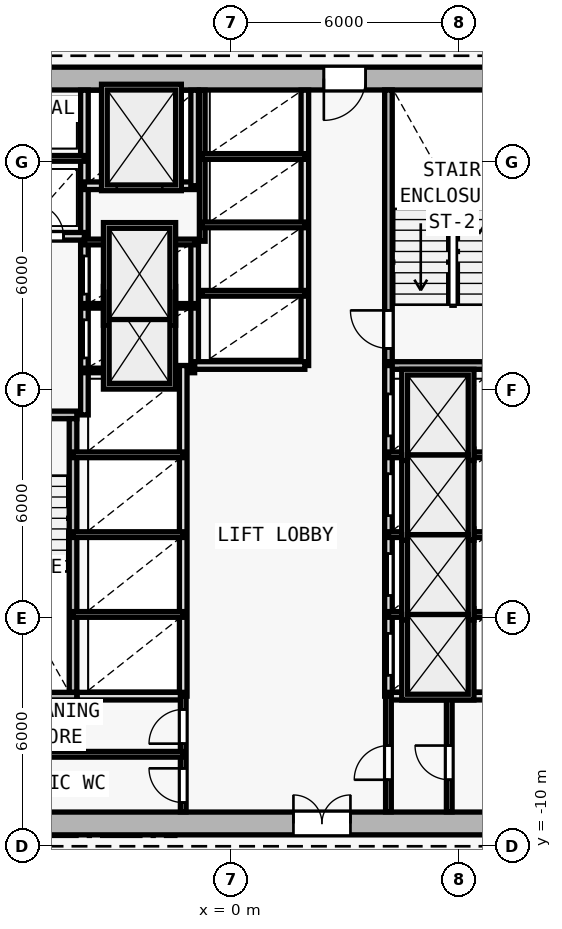
"""IFC4 building model, lengths in metres.
Left out: names, types, materials, properties, quantities, classifications, styles, units other than length and angle.
Written with IfcOpenShell. Run it as: python <this file> out.ifc"""

import sys

from ifc_helpers import new_model, si_unit, direction, frame, frame_2d, origin, origin_2d, place, context, subcontext, project, spatial, rectangle, i_section, extrude, element, fill, save


model = new_model("IFC4")
c1 = context("Model", 3, precision=1e-05, world=origin(), true_north=direction((0.0, 1.0)))
c2 = subcontext(c1, "Body", "Model", "MODEL_VIEW")
j1 = project(units=[si_unit("LENGTHUNIT", "METRE"), si_unit("PLANEANGLEUNIT", "RADIAN")], contexts=[c1])
p1 = place(None, origin())
s1 = spatial("IfcSite", under=j1, at=p1, CompositionType="ELEMENT")
p2 = place(p1, origin())
s2 = spatial("IfcBuilding", under=s1, at=p2, CompositionType="ELEMENT")
p3 = place(p2, frame((0.0, 0.0, 37.2)))
s3 = spatial("IfcBuildingStorey", under=s2, at=p3, CompositionType="ELEMENT", Elevation=37.2)
p4 = place(p3, frame((0.0, -9.4, 0.0), z_axis=(0.0, 0.0, 1.0), x_axis=(1.0, 0.0, 0.0)))
e1 = element("IfcColumn", 1, at=p4, inside=s3, PredefinedType="COLUMN", context=c2, shape_type="SweptSolid", body=[
    extrude(i_section(OverallWidth=0.416, OverallDepth=0.446, WebThickness=0.025, FlangeThickness=0.04, FilletRadius=0.015, at=origin_2d()), origin(), (0.0, 0.0, 1.0), 3.6),
])
p5 = place(p3, frame((-8.0, -9.4, 0.0), z_axis=(0.0, 0.0, 1.0), x_axis=(1.0, 0.0, 0.0)))
e2 = element("IfcWall", 2, at=p5, inside=s3, PredefinedType="SHEAR", context=c2, shape_type="SweptSolid", body=[
    extrude(rectangle(XDim=16.0, YDim=0.6, at=frame_2d((8.0, 0.0))), origin(), (0.0, 0.0, 1.0), 3.35),
])
p6 = place(p5, frame((9.65, 0.0, 0.0)))
e3 = element("IfcOpeningElement", 3, at=p6, cuts=e2, PredefinedType="OPENING", context=c2, shape_type="SweptSolid", body=[
    extrude(rectangle(XDim=1.5, YDim=2.2, at=frame_2d((0.75, 1.1))), frame((0.0, 0.31, 0.0), z_axis=(0.0, -1.0, 0.0), x_axis=(1.0, 0.0, 0.0)), (0.0, 0.0, 1.0), 0.62),
])
p7 = place(p3, frame((8.0, 10.2, 0.0), z_axis=(0.0, 0.0, 1.0), x_axis=(-1.0, 0.0, 0.0)))
e4 = element("IfcWall", 4, at=p7, inside=s3, PredefinedType="SHEAR", context=c2, shape_type="SweptSolid", body=[
    extrude(rectangle(XDim=16.0, YDim=0.6, at=frame_2d((8.0, 0.0))), origin(), (0.0, 0.0, 1.0), 3.35),
])
p8 = place(p7, frame((4.45, 0.0, 0.0)))
e5 = element("IfcOpeningElement", 5, at=p8, cuts=e4, PredefinedType="OPENING", context=c2, shape_type="SweptSolid", body=[
    extrude(rectangle(XDim=1.1, YDim=2.15, at=frame_2d((0.55, 1.075))), frame((0.0, 0.31, 0.0), z_axis=(0.0, -1.0, 0.0), x_axis=(1.0, 0.0, 0.0)), (0.0, 0.0, 1.0), 0.62),
])
p9 = place(p3, frame((-7.4, 1.35, 0.0), z_axis=(0.0, 0.0, 1.0), x_axis=(1.0, 0.0, 0.0)))
e6 = element("IfcWall", 6, at=p9, inside=s3, PredefinedType="SOLIDWALL", context=c2, shape_type="SweptSolid", body=[
    extrude(rectangle(XDim=3.35, YDim=0.2, at=frame_2d((1.675, 0.0))), origin(), (0.0, 0.0, 1.0), 3.35),
])
p10 = place(p9, frame((0.65, 0.0, 0.0)))
e7 = element("IfcOpeningElement", 7, at=p10, cuts=e6, PredefinedType="OPENING", context=c2, shape_type="SweptSolid", body=[
    extrude(rectangle(XDim=1.0, YDim=2.15, at=frame_2d((0.5, 1.075))), frame((0.0, 0.11, 0.0), z_axis=(0.0, -1.0, 0.0), x_axis=(1.0, 0.0, 0.0)), (0.0, 0.0, 1.0), 0.22),
])
p11 = place(p3, frame((-4.15, -5.95, 0.0), z_axis=(0.0, 0.0, 1.0), x_axis=(0.0, 1.0, 0.0)))
e8 = element("IfcWall", 8, at=p11, inside=s3, PredefinedType="SOLIDWALL", context=c2, shape_type="SweptSolid", body=[
    extrude(rectangle(XDim=7.2, YDim=0.2, at=frame_2d((3.6, 0.0))), origin(), (0.0, 0.0, 1.0), 3.35),
])
p12 = place(p3, frame((-3.85, 1.35, 0.0), z_axis=(0.0, 0.0, 1.0), x_axis=(0.0, 1.0, 0.0)))
e9 = element("IfcWall", 9, at=p12, inside=s3, PredefinedType="SOLIDWALL", context=c2, shape_type="SweptSolid", body=[
    extrude(rectangle(XDim=8.545, YDim=0.2, at=frame_2d((4.272, 0.0))), origin(), (0.0, 0.0, 1.0), 3.35),
])
p13 = place(p12, frame((1.5, 0.0, 0.0)))
e10 = element("IfcOpeningElement", 10, at=p13, cuts=e9, PredefinedType="OPENING", context=c2, shape_type="SweptSolid", body=[
    extrude(rectangle(XDim=1.0, YDim=2.15, at=frame_2d((0.5, 1.075))), frame((0.0, 0.11, 0.0), z_axis=(0.0, -1.0, 0.0), x_axis=(1.0, 0.0, 0.0)), (0.0, 0.0, 1.0), 0.22),
])
p14 = place(p12, frame((3.18, 0.0, 0.0)))
e11 = element("IfcOpeningElement", 11, at=p14, cuts=e9, PredefinedType="OPENING", context=c2, shape_type="SweptSolid", body=[
    extrude(rectangle(XDim=1.0, YDim=2.15, at=frame_2d((0.5, 1.075))), frame((0.0, 0.11, 0.0), z_axis=(0.0, -1.0, 0.0), x_axis=(1.0, 0.0, 0.0)), (0.0, 0.0, 1.0), 0.22),
])
p15 = place(p3, frame((-7.395, 6.05, 0.0), z_axis=(0.0, 0.0, 1.0), x_axis=(1.0, 0.0, 0.0)))
e12 = element("IfcWall", 12, at=p15, inside=s3, PredefinedType="SOLIDWALL", context=c2, shape_type="SweptSolid", body=[
    extrude(rectangle(XDim=3.545, YDim=0.2, at=frame_2d((1.772, 0.0))), origin(), (0.0, 0.0, 1.0), 3.35),
])
p16 = place(p15, frame((0.345, 0.0, 0.0)))
e13 = element("IfcOpeningElement", 13, at=p16, cuts=e12, PredefinedType="OPENING", context=c2, shape_type="SweptSolid", body=[
    extrude(rectangle(XDim=0.85, YDim=2.1, at=frame_2d((0.425, 1.05))), frame((0.0, 0.11, 0.0), z_axis=(0.0, -1.0, 0.0), x_axis=(1.0, 0.0, 0.0)), (0.0, 0.0, 1.0), 0.22),
])
p17 = place(p15, frame((2.145, 0.0, 0.0)))
e14 = element("IfcOpeningElement", 14, at=p17, cuts=e12, PredefinedType="OPENING", context=c2, shape_type="SweptSolid", body=[
    extrude(rectangle(XDim=0.85, YDim=2.1, at=frame_2d((0.425, 1.05))), frame((0.0, 0.11, 0.0), z_axis=(0.0, -1.0, 0.0), x_axis=(1.0, 0.0, 0.0)), (0.0, 0.0, 1.0), 0.22),
])
p18 = place(p3, frame((-7.395, 8.1, 0.0), z_axis=(0.0, 0.0, 1.0), x_axis=(1.0, 0.0, 0.0)))
e15 = element("IfcWall", 15, at=p18, inside=s3, PredefinedType="PARTITIONING", context=c2, shape_type="SweptSolid", body=[
    extrude(rectangle(XDim=3.545, YDim=0.15, at=frame_2d((1.772, 0.0))), origin(), (0.0, 0.0, 1.0), 3.35),
])
p19 = place(p3, frame((4.15, 2.75, 0.0), z_axis=(0.0, 0.0, 1.0), x_axis=(0.0, 1.0, 0.0)))
e16 = element("IfcWall", 16, at=p19, inside=s3, PredefinedType="SOLIDWALL", context=c2, shape_type="SweptSolid", body=[
    extrude(rectangle(XDim=7.15, YDim=0.2, at=frame_2d((3.575, 0.0))), origin(), (0.0, 0.0, 1.0), 3.35),
])
p20 = place(p19, frame((0.35, 0.0, 0.0)))
e17 = element("IfcOpeningElement", 17, at=p20, cuts=e16, PredefinedType="OPENING", context=c2, shape_type="SweptSolid", body=[
    extrude(rectangle(XDim=1.0, YDim=2.15, at=frame_2d((0.5, 1.075))), frame((0.0, 0.11, 0.0), z_axis=(0.0, -1.0, 0.0), x_axis=(1.0, 0.0, 0.0)), (0.0, 0.0, 1.0), 0.22),
])
p21 = place(p3, frame((4.05, 2.65, 0.0), z_axis=(0.0, 0.0, 1.0), x_axis=(1.0, 0.0, 0.0)))
e18 = element("IfcWall", 18, at=p21, inside=s3, PredefinedType="SOLIDWALL", context=c2, shape_type="SweptSolid", body=[
    extrude(rectangle(XDim=3.35, YDim=0.2, at=frame_2d((1.675, 0.0))), origin(), (0.0, 0.0, 1.0), 3.35),
])
p22 = place(p3, frame((-0.95, 2.65, 0.0), z_axis=(0.0, 0.0, 1.0), x_axis=(0.0, 1.0, 0.0)))
e19 = element("IfcWall", 19, at=p22, inside=s3, PredefinedType="SOLIDWALL", context=c2, shape_type="SweptSolid", body=[
    extrude(rectangle(XDim=3.27, YDim=0.2, at=frame_2d((1.635, 0.0))), origin(), (0.0, 0.0, 1.0), 3.35),
])
for number, where, z_axis, x_axis in (
    (20, (-3.85, 2.52, 0.0), (0.0, 0.0, 1.0), (1.0, 0.0, 0.0)),
    (21, (-3.85, 4.22, 0.0), (0.0, 0.0, 1.0), (1.0, 0.0, 0.0)),
):
    element("IfcWall", number, at=place(p3, frame(where, z_axis=z_axis, x_axis=x_axis)), inside=s3, PredefinedType="PARTITIONING", context=c2, shape_type="SweptSolid", body=[
        extrude(rectangle(XDim=2.9, YDim=0.12, at=frame_2d((1.45, 0.0))), origin(), (0.0, 0.0, 1.0), 3.35),
    ])
p23 = place(p3, frame((-3.85, 5.9, 0.0), z_axis=(0.0, 0.0, 1.0), x_axis=(1.0, 0.0, 0.0)))
e22 = element("IfcWall", 22, at=p23, inside=s3, PredefinedType="PARTITIONING", context=c2, shape_type="SweptSolid", body=[
    extrude(rectangle(XDim=2.9, YDim=0.15, at=frame_2d((1.45, 0.0))), origin(), (0.0, 0.0, 1.0), 3.35),
])
p24 = place(p3, frame((-3.85, 7.38, 0.0), z_axis=(0.0, 0.0, 1.0), x_axis=(1.0, 0.0, 0.0)))
e23 = element("IfcWall", 23, at=p24, inside=s3, PredefinedType="SOLIDWALL", context=c2, shape_type="SweptSolid", body=[
    extrude(rectangle(XDim=2.9, YDim=0.2, at=frame_2d((1.45, 0.0))), origin(), (0.0, 0.0, 1.0), 3.35),
])
p25 = place(p24, frame((0.85, 0.0, 0.0)))
e24 = element("IfcOpeningElement", 24, at=p25, cuts=e23, PredefinedType="OPENING", context=c2, shape_type="SweptSolid", body=[
    extrude(rectangle(XDim=1.2, YDim=2.2, at=frame_2d((0.6, 1.1))), frame((0.0, 0.11, 0.0), z_axis=(0.0, -1.0, 0.0), x_axis=(1.0, 0.0, 0.0)), (0.0, 0.0, 1.0), 0.22),
])
p26 = place(p3, frame((-0.95, 7.38, 0.0), z_axis=(0.0, 0.0, 1.0), x_axis=(0.0, 1.0, 0.0)))
e25 = element("IfcWall", 25, at=p26, inside=s3, PredefinedType="SOLIDWALL", context=c2, shape_type="SweptSolid", body=[
    extrude(rectangle(XDim=2.515, YDim=0.2, at=frame_2d((1.258, 0.0))), origin(), (0.0, 0.0, 1.0), 3.35),
])
p27 = place(p3, frame((4.15, -6.05, 0.0), z_axis=(0.0, 0.0, 1.0), x_axis=(0.0, 1.0, 0.0)))
e26 = element("IfcWall", 26, at=p27, inside=s3, PredefinedType="SOLIDWALL", context=c2, shape_type="SweptSolid", body=[
    extrude(rectangle(XDim=8.7, YDim=0.2, at=frame_2d((4.35, 0.0))), origin(), (0.0, 0.0, 1.0), 3.35),
])
p28 = place(p27, frame((0.55, 0.0, 0.0)))
e27 = element("IfcOpeningElement", 27, at=p28, cuts=e26, PredefinedType="OPENING", context=c2, shape_type="SweptSolid", body=[
    extrude(rectangle(XDim=1.1, YDim=2.15, at=frame_2d((0.55, 1.075))), frame((0.0, 0.11, 0.0), z_axis=(0.0, -1.0, 0.0), x_axis=(1.0, 0.0, 0.0)), (0.0, 0.0, 1.0), 0.22),
])
p29 = place(p27, frame((2.65, 0.0, 0.0)))
e28 = element("IfcOpeningElement", 28, at=p29, cuts=e26, PredefinedType="OPENING", context=c2, shape_type="SweptSolid", body=[
    extrude(rectangle(XDim=1.1, YDim=2.15, at=frame_2d((0.55, 1.075))), frame((0.0, 0.11, 0.0), z_axis=(0.0, -1.0, 0.0), x_axis=(1.0, 0.0, 0.0)), (0.0, 0.0, 1.0), 0.22),
])
p30 = place(p27, frame((4.75, 0.0, 0.0)))
e29 = element("IfcOpeningElement", 29, at=p30, cuts=e26, PredefinedType="OPENING", context=c2, shape_type="SweptSolid", body=[
    extrude(rectangle(XDim=1.1, YDim=2.15, at=frame_2d((0.55, 1.075))), frame((0.0, 0.11, 0.0), z_axis=(0.0, -1.0, 0.0), x_axis=(1.0, 0.0, 0.0)), (0.0, 0.0, 1.0), 0.22),
])
p31 = place(p27, frame((6.85, 0.0, 0.0)))
e30 = element("IfcOpeningElement", 30, at=p31, cuts=e26, PredefinedType="OPENING", context=c2, shape_type="SweptSolid", body=[
    extrude(rectangle(XDim=1.1, YDim=2.15, at=frame_2d((0.55, 1.075))), frame((0.0, 0.11, 0.0), z_axis=(0.0, -1.0, 0.0), x_axis=(1.0, 0.0, 0.0)), (0.0, 0.0, 1.0), 0.22),
])
for number, where, z_axis, x_axis in (
    (31, (4.15, -3.9, 0.0), (0.0, 0.0, 1.0), (1.0, 0.0, 0.0)),
    (32, (4.15, -1.8, 0.0), (0.0, 0.0, 1.0), (1.0, 0.0, 0.0)),
    (33, (4.15, 0.3, 0.0), (0.0, 0.0, 1.0), (1.0, 0.0, 0.0)),
):
    element("IfcWall", number, at=place(p3, frame(where, z_axis=z_axis, x_axis=x_axis)), inside=s3, PredefinedType="PARTITIONING", context=c2, shape_type="SweptSolid", body=[
        extrude(rectangle(XDim=2.6, YDim=0.15, at=frame_2d((1.3, 0.0))), origin(), (0.0, 0.0, 1.0), 3.35),
    ])
p32 = place(p3, frame((-1.25, -6.05, 0.0), z_axis=(0.0, 0.0, 1.0), x_axis=(0.0, 1.0, 0.0)))
e34 = element("IfcWall", 34, at=p32, inside=s3, PredefinedType="SOLIDWALL", context=c2, shape_type="SweptSolid", body=[
    extrude(rectangle(XDim=8.7, YDim=0.2, at=frame_2d((4.35, 0.0))), origin(), (0.0, 0.0, 1.0), 3.35),
])
for number, where, z_axis, x_axis in (
    (35, (-4.15, -3.9, 0.0), (0.0, 0.0, 1.0), (1.0, 0.0, 0.0)),
    (36, (-4.15, -1.8, 0.0), (0.0, 0.0, 1.0), (1.0, 0.0, 0.0)),
    (37, (-4.15, 0.3, 0.0), (0.0, 0.0, 1.0), (1.0, 0.0, 0.0)),
):
    element("IfcWall", number, at=place(p3, frame(where, z_axis=z_axis, x_axis=x_axis)), inside=s3, PredefinedType="PARTITIONING", context=c2, shape_type="SweptSolid", body=[
        extrude(rectangle(XDim=2.9, YDim=0.15, at=frame_2d((1.45, 0.0))), origin(), (0.0, 0.0, 1.0), 3.35),
    ])
p33 = place(p3, frame((1.95, 2.65, 0.0), z_axis=(0.0, 0.0, 1.0), x_axis=(0.0, 1.0, 0.0)))
e38 = element("IfcWall", 38, at=p33, inside=s3, PredefinedType="SOLIDWALL", context=c2, shape_type="SweptSolid", body=[
    extrude(rectangle(XDim=7.245, YDim=0.2, at=frame_2d((3.623, 0.0))), origin(), (0.0, 0.0, 1.0), 3.35),
])
p34 = place(p3, frame((-0.95, 2.65, 0.0), z_axis=(0.0, 0.0, 1.0), x_axis=(1.0, 0.0, 0.0)))
e39 = element("IfcWall", 39, at=p34, inside=s3, PredefinedType="SOLIDWALL", context=c2, shape_type="SweptSolid", body=[
    extrude(rectangle(XDim=2.9, YDim=0.2, at=frame_2d((1.45, 0.0))), origin(), (0.0, 0.0, 1.0), 3.35),
])
p35 = place(p3, frame((-0.75, 5.92, 0.0), z_axis=(0.0, 0.0, 1.0), x_axis=(0.0, 1.0, 0.0)))
e40 = element("IfcWall", 40, at=p35, inside=s3, PredefinedType="PARTITIONING", context=c2, shape_type="SweptSolid", body=[
    extrude(rectangle(XDim=3.975, YDim=0.15, at=frame_2d((1.988, 0.0))), origin(), (0.0, 0.0, 1.0), 3.35),
])
for number, where, z_axis, x_axis in (
    (41, (-0.75, 4.55, 0.0), (0.0, 0.0, 1.0), (1.0, 0.0, 0.0)),
    (42, (-0.75, 6.35, 0.0), (0.0, 0.0, 1.0), (1.0, 0.0, 0.0)),
    (43, (-0.75, 8.15, 0.0), (0.0, 0.0, 1.0), (1.0, 0.0, 0.0)),
):
    element("IfcWall", number, at=place(p3, frame(where, z_axis=z_axis, x_axis=x_axis)), inside=s3, PredefinedType="PARTITIONING", context=c2, shape_type="SweptSolid", body=[
        extrude(rectangle(XDim=2.7, YDim=0.15, at=frame_2d((1.35, 0.0))), origin(), (0.0, 0.0, 1.0), 3.35),
    ])
p36 = place(p3, frame((-7.4, -6.05, 0.0), z_axis=(0.0, 0.0, 1.0), x_axis=(1.0, 0.0, 0.0)))
e44 = element("IfcWall", 44, at=p36, inside=s3, PredefinedType="SOLIDWALL", context=c2, shape_type="SweptSolid", body=[
    extrude(rectangle(XDim=3.35, YDim=0.2, at=frame_2d((1.675, 0.0))), origin(), (0.0, 0.0, 1.0), 3.35),
])
p37 = place(p3, frame((-4.04, -6.05, 0.0), z_axis=(0.0, 0.0, 1.0), x_axis=(1.0, 0.0, 0.0)))
e45 = element("IfcWall", 45, at=p37, inside=s3, PredefinedType="SOLIDWALL", context=c2, shape_type="SweptSolid", body=[
    extrude(rectangle(XDim=2.79, YDim=0.2, at=frame_2d((1.395, 0.0))), origin(), (0.0, 0.0, 1.0), 3.35),
])
p38 = place(p3, frame((4.15, -6.05, 0.0), z_axis=(0.0, 0.0, 1.0), x_axis=(1.0, 0.0, 0.0)))
e46 = element("IfcWall", 46, at=p38, inside=s3, PredefinedType="SOLIDWALL", context=c2, shape_type="SweptSolid", body=[
    extrude(rectangle(XDim=3.245, YDim=0.2, at=frame_2d((1.623, 0.0))), origin(), (0.0, 0.0, 1.0), 3.35),
])
p39 = place(p3, frame((-1.25, -9.095, 0.0), z_axis=(0.0, 0.0, 1.0), x_axis=(0.0, 1.0, 0.0)))
e47 = element("IfcWall", 47, at=p39, inside=s3, PredefinedType="PARTITIONING", context=c2, shape_type="SweptSolid", body=[
    extrude(rectangle(XDim=3.045, YDim=0.15, at=frame_2d((1.522, 0.0))), origin(), (0.0, 0.0, 1.0), 3.35),
])
p40 = place(p39, frame((1.795, 0.0, 0.0)))
e48 = element("IfcOpeningElement", 48, at=p40, cuts=e47, PredefinedType="OPENING", context=c2, shape_type="SweptSolid", body=[
    extrude(rectangle(XDim=0.9, YDim=2.1, at=frame_2d((0.45, 1.05))), frame((0.0, 0.085, 0.0), z_axis=(0.0, -1.0, 0.0), x_axis=(1.0, 0.0, 0.0)), (0.0, 0.0, 1.0), 0.17),
])
p41 = place(p39, frame((0.245, 0.0, 0.0)))
e49 = element("IfcOpeningElement", 49, at=p41, cuts=e47, PredefinedType="OPENING", context=c2, shape_type="SweptSolid", body=[
    extrude(rectangle(XDim=0.9, YDim=2.1, at=frame_2d((0.45, 1.05))), frame((0.0, 0.085, 0.0), z_axis=(0.0, -1.0, 0.0), x_axis=(1.0, 0.0, 0.0)), (0.0, 0.0, 1.0), 0.17),
])
p42 = place(p3, frame((4.15, -9.095, 0.0), z_axis=(0.0, 0.0, 1.0), x_axis=(0.0, 1.0, 0.0)))
e50 = element("IfcWall", 50, at=p42, inside=s3, PredefinedType="PARTITIONING", context=c2, shape_type="SweptSolid", body=[
    extrude(rectangle(XDim=3.045, YDim=0.15, at=frame_2d((1.522, 0.0))), origin(), (0.0, 0.0, 1.0), 3.35),
])
p43 = place(p42, frame((0.845, 0.0, 0.0)))
e51 = element("IfcOpeningElement", 51, at=p43, cuts=e50, PredefinedType="OPENING", context=c2, shape_type="SweptSolid", body=[
    extrude(rectangle(XDim=0.9, YDim=2.1, at=frame_2d((0.45, 1.05))), frame((0.0, 0.085, 0.0), z_axis=(0.0, -1.0, 0.0), x_axis=(1.0, 0.0, 0.0)), (0.0, 0.0, 1.0), 0.17),
])
p44 = place(p3, frame((-7.395, -7.58, 0.0), z_axis=(0.0, 0.0, 1.0), x_axis=(1.0, 0.0, 0.0)))
e52 = element("IfcWall", 52, at=p44, inside=s3, PredefinedType="PARTITIONING", context=c2, shape_type="SweptSolid", body=[
    extrude(rectangle(XDim=6.145, YDim=0.15, at=frame_2d((3.073, 0.0))), origin(), (0.0, 0.0, 1.0), 3.35),
])
p45 = place(p3, frame((5.75, -9.095, 0.0), z_axis=(0.0, 0.0, 1.0), x_axis=(0.0, 1.0, 0.0)))
e53 = element("IfcWall", 53, at=p45, inside=s3, PredefinedType="PARTITIONING", context=c2, shape_type="SweptSolid", body=[
    extrude(rectangle(XDim=3.045, YDim=0.15, at=frame_2d((1.522, 0.0))), origin(), (0.0, 0.0, 1.0), 3.35),
])
p46 = place(p45, frame((0.845, 0.0, 0.0)))
e54 = element("IfcOpeningElement", 54, at=p46, cuts=e53, PredefinedType="OPENING", context=c2, shape_type="SweptSolid", body=[
    extrude(rectangle(XDim=0.9, YDim=2.1, at=frame_2d((0.45, 1.05))), frame((0.0, 0.085, 0.0), z_axis=(0.0, -1.0, 0.0), x_axis=(1.0, 0.0, 0.0)), (0.0, 0.0, 1.0), 0.17),
])
p47 = place(p6, origin())
e55 = element("IfcDoor", 55, at=p47, inside=s3, OperationType="DOUBLE_DOOR_SINGLE_SWING", PredefinedType="DOOR", context=c2, shape_type="SweptSolid", body=[
    extrude(rectangle(XDim=1.5, YDim=2.2, at=frame_2d((0.75, 1.1))), frame((0.0, 0.025, 0.0), z_axis=(0.0, -1.0, 0.0), x_axis=(1.0, 0.0, 0.0)), (0.0, 0.0, 1.0), 0.05),
])
fill(e3, e55)
p48 = place(p8, origin())
e56 = element("IfcDoor", 56, at=p48, inside=s3, OperationType="SINGLE_SWING_RIGHT", PredefinedType="DOOR", context=c2, shape_type="SweptSolid", body=[
    extrude(rectangle(XDim=1.1, YDim=2.15, at=frame_2d((0.55, 1.075))), frame((0.0, 0.025, 0.0), z_axis=(0.0, -1.0, 0.0), x_axis=(1.0, 0.0, 0.0)), (0.0, 0.0, 1.0), 0.05),
])
fill(e5, e56)
p49 = place(p17, origin())
e57 = element("IfcDoor", 57, at=p49, inside=s3, OperationType="SINGLE_SWING_LEFT", PredefinedType="DOOR", context=c2, shape_type="SweptSolid", body=[
    extrude(rectangle(XDim=0.85, YDim=2.1, at=frame_2d((0.425, 1.05))), frame((0.0, 0.025, 0.0), z_axis=(0.0, -1.0, 0.0), x_axis=(1.0, 0.0, 0.0)), (0.0, 0.0, 1.0), 0.05),
])
fill(e14, e57)
p50 = place(p20, origin())
e58 = element("IfcDoor", 58, at=p50, inside=s3, OperationType="SINGLE_SWING_RIGHT", PredefinedType="DOOR", context=c2, shape_type="SweptSolid", body=[
    extrude(rectangle(XDim=1.0, YDim=2.15, at=frame_2d((0.5, 1.075))), frame((0.0, 0.025, 0.0), z_axis=(0.0, -1.0, 0.0), x_axis=(1.0, 0.0, 0.0)), (0.0, 0.0, 1.0), 0.05),
])
fill(e17, e58)
p51 = place(p25, origin())
e59 = element("IfcDoor", 59, at=p51, inside=s3, OperationType="DOUBLE_DOOR_SLIDING", PredefinedType="DOOR", context=c2, shape_type="SweptSolid", body=[
    extrude(rectangle(XDim=1.2, YDim=2.2, at=frame_2d((0.6, 1.1))), frame((0.0, 0.025, 0.0), z_axis=(0.0, -1.0, 0.0), x_axis=(1.0, 0.0, 0.0)), (0.0, 0.0, 1.0), 0.05),
])
fill(e24, e59)
p52 = place(p28, origin())
e60 = element("IfcDoor", 60, at=p52, inside=s3, OperationType="DOUBLE_DOOR_SLIDING", PredefinedType="DOOR", context=c2, shape_type="SweptSolid", body=[
    extrude(rectangle(XDim=1.1, YDim=2.15, at=frame_2d((0.55, 1.075))), frame((0.0, 0.025, 0.0), z_axis=(0.0, -1.0, 0.0), x_axis=(1.0, 0.0, 0.0)), (0.0, 0.0, 1.0), 0.05),
])
fill(e27, e60)
p53 = place(p29, origin())
e61 = element("IfcDoor", 61, at=p53, inside=s3, OperationType="DOUBLE_DOOR_SLIDING", PredefinedType="DOOR", context=c2, shape_type="SweptSolid", body=[
    extrude(rectangle(XDim=1.1, YDim=2.15, at=frame_2d((0.55, 1.075))), frame((0.0, 0.025, 0.0), z_axis=(0.0, -1.0, 0.0), x_axis=(1.0, 0.0, 0.0)), (0.0, 0.0, 1.0), 0.05),
])
fill(e28, e61)
p54 = place(p30, origin())
e62 = element("IfcDoor", 62, at=p54, inside=s3, OperationType="DOUBLE_DOOR_SLIDING", PredefinedType="DOOR", context=c2, shape_type="SweptSolid", body=[
    extrude(rectangle(XDim=1.1, YDim=2.15, at=frame_2d((0.55, 1.075))), frame((0.0, 0.025, 0.0), z_axis=(0.0, -1.0, 0.0), x_axis=(1.0, 0.0, 0.0)), (0.0, 0.0, 1.0), 0.05),
])
fill(e29, e62)
p55 = place(p31, origin())
e63 = element("IfcDoor", 63, at=p55, inside=s3, OperationType="DOUBLE_DOOR_SLIDING", PredefinedType="DOOR", context=c2, shape_type="SweptSolid", body=[
    extrude(rectangle(XDim=1.1, YDim=2.15, at=frame_2d((0.55, 1.075))), frame((0.0, 0.025, 0.0), z_axis=(0.0, -1.0, 0.0), x_axis=(1.0, 0.0, 0.0)), (0.0, 0.0, 1.0), 0.05),
])
fill(e30, e63)
p56 = place(p13, origin())
e64 = element("IfcDoor", 64, at=p56, inside=s3, OperationType="DOUBLE_DOOR_SLIDING", PredefinedType="DOOR", context=c2, shape_type="SweptSolid", body=[
    extrude(rectangle(XDim=1.0, YDim=2.15, at=frame_2d((0.5, 1.075))), frame((0.0, 0.025, 0.0), z_axis=(0.0, -1.0, 0.0), x_axis=(1.0, 0.0, 0.0)), (0.0, 0.0, 1.0), 0.05),
])
fill(e10, e64)
p57 = place(p14, origin())
e65 = element("IfcDoor", 65, at=p57, inside=s3, OperationType="DOUBLE_DOOR_SLIDING", PredefinedType="DOOR", context=c2, shape_type="SweptSolid", body=[
    extrude(rectangle(XDim=1.0, YDim=2.15, at=frame_2d((0.5, 1.075))), frame((0.0, 0.025, 0.0), z_axis=(0.0, -1.0, 0.0), x_axis=(1.0, 0.0, 0.0)), (0.0, 0.0, 1.0), 0.05),
])
fill(e11, e65)
p58 = place(p40, origin())
e66 = element("IfcDoor", 66, at=p58, inside=s3, OperationType="SINGLE_SWING_LEFT", PredefinedType="DOOR", context=c2, shape_type="SweptSolid", body=[
    extrude(rectangle(XDim=0.9, YDim=2.1, at=frame_2d((0.45, 1.05))), frame((0.0, 0.025, 0.0), z_axis=(0.0, -1.0, 0.0), x_axis=(1.0, 0.0, 0.0)), (0.0, 0.0, 1.0), 0.05),
])
fill(e48, e66)
p59 = place(p41, origin())
e67 = element("IfcDoor", 67, at=p59, inside=s3, OperationType="SINGLE_SWING_RIGHT", PredefinedType="DOOR", context=c2, shape_type="SweptSolid", body=[
    extrude(rectangle(XDim=0.9, YDim=2.1, at=frame_2d((0.45, 1.05))), frame((0.0, 0.025, 0.0), z_axis=(0.0, -1.0, 0.0), x_axis=(1.0, 0.0, 0.0)), (0.0, 0.0, 1.0), 0.05),
])
fill(e49, e67)
p60 = place(p43, origin())
e68 = element("IfcDoor", 68, at=p60, inside=s3, OperationType="SINGLE_SWING_LEFT", PredefinedType="DOOR", context=c2, shape_type="SweptSolid", body=[
    extrude(rectangle(XDim=0.9, YDim=2.1, at=frame_2d((0.45, 1.05))), frame((0.0, 0.025, 0.0), z_axis=(0.0, -1.0, 0.0), x_axis=(1.0, 0.0, 0.0)), (0.0, 0.0, 1.0), 0.05),
])
fill(e51, e68)
p61 = place(p46, origin())
e69 = element("IfcDoor", 69, at=p61, inside=s3, OperationType="SINGLE_SWING_RIGHT", PredefinedType="DOOR", context=c2, shape_type="SweptSolid", body=[
    extrude(rectangle(XDim=0.9, YDim=2.1, at=frame_2d((0.45, 1.05))), frame((0.0, 0.025, 0.0), z_axis=(0.0, -1.0, 0.0), x_axis=(1.0, 0.0, 0.0)), (0.0, 0.0, 1.0), 0.05),
])
fill(e54, e69)
save(model, sys.argv[1])
